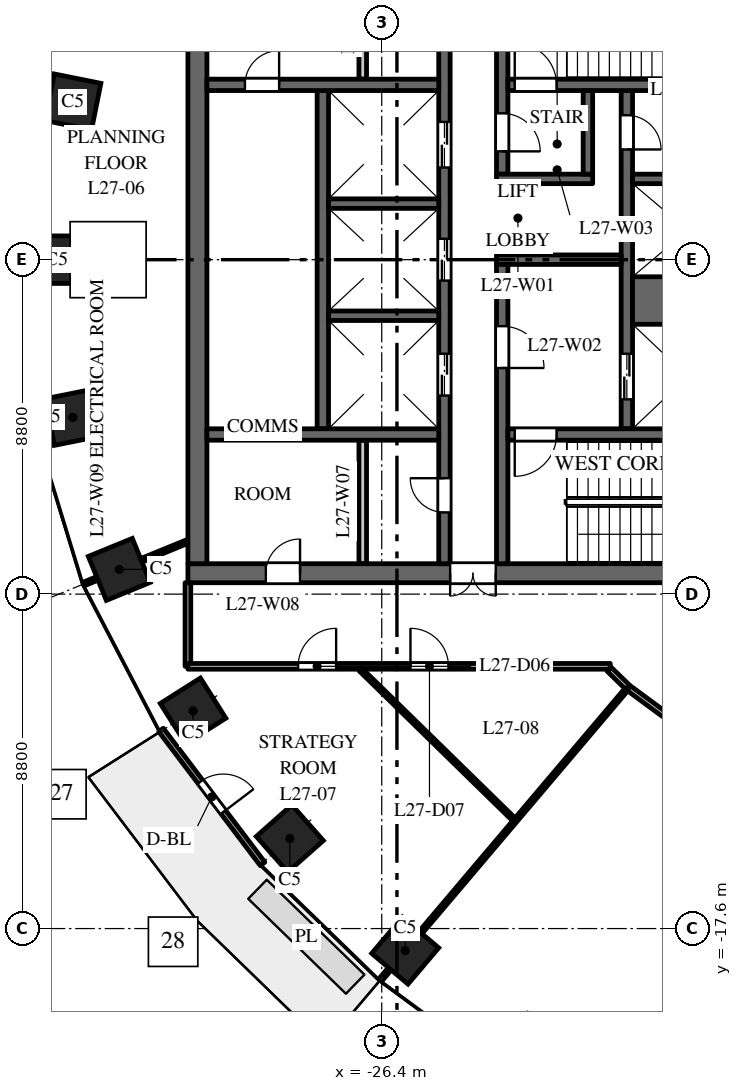
"""IFC4 building model, lengths in metres.
Left out: names, types, materials, properties, quantities, classifications, styles, units other than length and angle.
Written with IfcOpenShell. Run it as: python <this file> out.ifc"""

import sys

from ifc_helpers import new_model, si_unit, direction, frame, frame_2d, origin, origin_2d, place, context, subcontext, project, spatial, rectangle, extrude, element, fill, save


model = new_model("IFC4")
c1 = context("Model", 3, precision=1e-05, world=origin(), true_north=direction((0.0, 1.0)))
c2 = subcontext(c1, "Body", "Model", "MODEL_VIEW")
j1 = project(units=[si_unit("LENGTHUNIT", "METRE"), si_unit("PLANEANGLEUNIT", "RADIAN")], contexts=[c1])
p1 = place(None, origin())
s1 = spatial("IfcSite", under=j1, at=p1, CompositionType="ELEMENT")
p2 = place(p1, origin())
s2 = spatial("IfcBuilding", under=s1, at=p2, CompositionType="ELEMENT")
p3 = place(p2, frame((0.0, 0.0, 120.0)))
s3 = spatial("IfcBuildingStorey", under=s2, at=p3, CompositionType="ELEMENT", Elevation=120.0)
for number, where, z_axis, x_axis in (
    (1, (-34.527, 4.151, 0.0), (0.0, 0.0, 1.0), (-0.197, -0.98, 0.0)),
    (2, (-34.945, 0.0, 0.0), (0.0, 0.0, 1.0), (0.0, -1.0, 0.0)),
    (3, (-34.527, -4.151, 0.0), (0.0, 0.0, 1.0), (0.197, -0.98, 0.0)),
    (4, (-33.305, -8.149, 0.0), (0.0, 0.0, 1.0), (0.379, -0.925, 0.0)),
    (5, (-31.365, -11.871, 0.0), (0.0, 0.0, 1.0), (0.535, -0.845, 0.0)),
    (6, (-28.819, -15.23, 0.0), (0.0, 0.0, 1.0), (0.663, -0.749, 0.0)),
    (7, (-25.783, -18.18, 0.0), (0.0, 0.0, 1.0), (0.763, -0.646, 0.0)),
):
    element("IfcColumn", number, at=place(p3, frame(where, z_axis=z_axis, x_axis=x_axis)), inside=s3, PredefinedType="COLUMN", context=c2, shape_type="SweptSolid", body=[
        extrude(rectangle(XDim=1.25, YDim=1.25, at=origin_2d()), origin(), (0.0, 0.0, 1.0), 4.0),
    ])
p4 = place(p3, frame((-16.5, -8.25, 0.0), z_axis=(0.0, 0.0, 1.0), x_axis=(-1.0, 0.0, 0.0)))
e8 = element("IfcWall", 8, at=p4, inside=s3, PredefinedType="SHEAR", context=c2, shape_type="SweptSolid", body=[
    extrude(rectangle(XDim=15.0, YDim=0.5, at=frame_2d((7.5, 0.0))), origin(), (0.0, 0.0, 1.0), 3.7),
])
p5 = place(p4, frame((6.9, 0.0, 0.0)))
e9 = element("IfcOpeningElement", 9, at=p5, cuts=e8, PredefinedType="OPENING", context=c2, shape_type="SweptSolid", body=[
    extrude(rectangle(XDim=1.2, YDim=2.1, at=frame_2d((0.6, 1.05))), frame((0.0, 0.26, 0.0), z_axis=(0.0, -1.0, 0.0), x_axis=(1.0, 0.0, 0.0)), (0.0, 0.0, 1.0), 0.52),
])
p6 = place(p4, frame((12.05, 0.0, 0.0)))
e10 = element("IfcOpeningElement", 10, at=p6, cuts=e8, PredefinedType="OPENING", context=c2, shape_type="SweptSolid", body=[
    extrude(rectangle(XDim=0.9, YDim=2.1, at=frame_2d((0.45, 1.05))), frame((0.0, 0.26, 0.0), z_axis=(0.0, -1.0, 0.0), x_axis=(1.0, 0.0, 0.0)), (0.0, 0.0, 1.0), 0.52),
])
p7 = place(p3, frame((-27.95, -4.45, 0.0), z_axis=(0.0, 0.0, 1.0), x_axis=(0.0, 1.0, 0.0)))
e11 = element("IfcWall", 11, at=p7, inside=s3, PredefinedType="SHEAR", context=c2, shape_type="SweptSolid", body=[
    extrude(rectangle(XDim=8.9, YDim=0.3, at=frame_2d((4.45, 0.0))), origin(), (0.0, 0.0, 1.0), 3.7),
])
p8 = place(p3, frame((-19.95, -4.45, 0.0), z_axis=(0.0, 0.0, 1.0), x_axis=(0.0, 1.0, 0.0)))
e12 = element("IfcWall", 12, at=p8, inside=s3, PredefinedType="SHEAR", context=c2, shape_type="SweptSolid", body=[
    extrude(rectangle(XDim=8.9, YDim=0.3, at=frame_2d((4.45, 0.0))), origin(), (0.0, 0.0, 1.0), 3.7),
])
p9 = place(p8, frame((0.775, 0.0, 0.0)))
e13 = element("IfcOpeningElement", 13, at=p9, cuts=e12, PredefinedType="OPENING", context=c2, shape_type="SweptSolid", body=[
    extrude(rectangle(XDim=1.2, YDim=2.1, at=frame_2d((0.6, 1.05))), frame((0.0, 0.16, 0.0), z_axis=(0.0, -1.0, 0.0), x_axis=(1.0, 0.0, 0.0)), (0.0, 0.0, 1.0), 0.32),
])
p10 = place(p8, frame((7.35, 0.0, 0.0)))
e14 = element("IfcOpeningElement", 14, at=p10, cuts=e12, PredefinedType="OPENING", context=c2, shape_type="SweptSolid", body=[
    extrude(rectangle(XDim=0.9, YDim=2.1, at=frame_2d((0.45, 1.05))), frame((0.0, 0.16, 0.0), z_axis=(0.0, -1.0, 0.0), x_axis=(1.0, 0.0, 0.0)), (0.0, 0.0, 1.0), 0.32),
])
p11 = place(p3, frame((-24.75, -8.0, 0.0), z_axis=(0.0, 0.0, 1.0), x_axis=(0.0, 1.0, 0.0)))
e15 = element("IfcWall", 15, at=p11, inside=s3, PredefinedType="SHEAR", context=c2, shape_type="SweptSolid", body=[
    extrude(rectangle(XDim=16.0, YDim=0.3, at=frame_2d((8.0, 0.0))), origin(), (0.0, 0.0, 1.0), 3.7),
])
p12 = place(p11, frame((4.425, 0.0, 0.0)))
e16 = element("IfcOpeningElement", 16, at=p12, cuts=e15, PredefinedType="OPENING", context=c2, shape_type="SweptSolid", body=[
    extrude(rectangle(XDim=1.1, YDim=2.1, at=frame_2d((0.55, 1.05))), frame((0.0, 0.16, 0.0), z_axis=(0.0, -1.0, 0.0), x_axis=(1.0, 0.0, 0.0)), (0.0, 0.0, 1.0), 0.32),
])
p13 = place(p11, frame((7.45, 0.0, 0.0)))
e17 = element("IfcOpeningElement", 17, at=p13, cuts=e15, PredefinedType="OPENING", context=c2, shape_type="SweptSolid", body=[
    extrude(rectangle(XDim=1.1, YDim=2.1, at=frame_2d((0.55, 1.05))), frame((0.0, 0.16, 0.0), z_axis=(0.0, -1.0, 0.0), x_axis=(1.0, 0.0, 0.0)), (0.0, 0.0, 1.0), 0.32),
])
p14 = place(p11, frame((10.425, 0.0, 0.0)))
e18 = element("IfcOpeningElement", 18, at=p14, cuts=e15, PredefinedType="OPENING", context=c2, shape_type="SweptSolid", body=[
    extrude(rectangle(XDim=1.2, YDim=2.1, at=frame_2d((0.6, 1.05))), frame((0.0, 0.16, 0.0), z_axis=(0.0, -1.0, 0.0), x_axis=(1.0, 0.0, 0.0)), (0.0, 0.0, 1.0), 0.32),
])
p15 = place(p11, frame((13.75, 0.0, 0.0)))
e19 = element("IfcOpeningElement", 19, at=p15, cuts=e15, PredefinedType="OPENING", context=c2, shape_type="SweptSolid", body=[
    extrude(rectangle(XDim=0.9, YDim=2.1, at=frame_2d((0.45, 1.05))), frame((0.0, 0.16, 0.0), z_axis=(0.0, -1.0, 0.0), x_axis=(1.0, 0.0, 0.0)), (0.0, 0.0, 1.0), 0.32),
])
p16 = place(p11, frame((1.35, 0.0, 0.0)))
e20 = element("IfcOpeningElement", 20, at=p16, cuts=e15, PredefinedType="OPENING", context=c2, shape_type="SweptSolid", body=[
    extrude(rectangle(XDim=0.9, YDim=2.1, at=frame_2d((0.45, 1.05))), frame((0.0, 0.16, 0.0), z_axis=(0.0, -1.0, 0.0), x_axis=(1.0, 0.0, 0.0)), (0.0, 0.0, 1.0), 0.32),
])
p17 = place(p3, frame((-20.1, 0.0, 0.0), z_axis=(0.0, 0.0, 1.0), x_axis=(-1.0, 0.0, 0.0)))
e21 = element("IfcWall", 21, at=p17, inside=s3, PredefinedType="SHEAR", context=c2, shape_type="SweptSolid", body=[
    extrude(rectangle(XDim=3.28, YDim=0.25, at=frame_2d((1.64, 0.0))), origin(), (0.0, 0.0, 1.0), 3.7),
])
p18 = place(p3, frame((-31.25, -8.0, 0.0), z_axis=(0.0, 0.0, 1.0), x_axis=(0.0, 1.0, 0.0)))
e22 = element("IfcWall", 22, at=p18, inside=s3, PredefinedType="SHEAR", context=c2, shape_type="SweptSolid", body=[
    extrude(rectangle(XDim=16.0, YDim=0.5, at=frame_2d((8.0, 0.0))), origin(), (0.0, 0.0, 1.0), 3.7),
])
p19 = place(p3, frame((-24.9, 4.6, 0.0), z_axis=(0.0, 0.0, 1.0), x_axis=(-1.0, 0.0, 0.0)))
e23 = element("IfcWall", 23, at=p19, inside=s3, PredefinedType="SHEAR", context=c2, shape_type="SweptSolid", body=[
    extrude(rectangle(XDim=6.1, YDim=0.3, at=frame_2d((3.05, 0.0))), origin(), (0.0, 0.0, 1.0), 3.7),
])
p20 = place(p19, frame((4.2, 0.0, 0.0)))
e24 = element("IfcOpeningElement", 24, at=p20, cuts=e23, PredefinedType="OPENING", context=c2, shape_type="SweptSolid", body=[
    extrude(rectangle(XDim=0.9, YDim=2.1, at=frame_2d((0.45, 1.05))), frame((0.0, 0.16, 0.0), z_axis=(0.0, -1.0, 0.0), x_axis=(1.0, 0.0, 0.0)), (0.0, 0.0, 1.0), 0.32),
])
for number, where, z_axis, x_axis in (
    (25, (-26.9, 4.75, 0.0), (0.0, 0.0, 1.0), (0.0, 1.0, 0.0)),
    (26, (-26.9, -8.0, 0.0), (0.0, 0.0, 1.0), (0.0, 1.0, 0.0)),
):
    element("IfcWall", number, at=place(p3, frame(where, z_axis=z_axis, x_axis=x_axis)), inside=s3, PredefinedType="PARTITIONING", context=c2, shape_type="SweptSolid", body=[
        extrude(rectangle(XDim=3.25, YDim=0.2, at=frame_2d((1.625, 0.0))), origin(), (0.0, 0.0, 1.0), 3.7),
    ])
p21 = place(p3, frame((-24.9, -4.6, 0.0), z_axis=(0.0, 0.0, 1.0), x_axis=(-1.0, 0.0, 0.0)))
e27 = element("IfcWall", 27, at=p21, inside=s3, PredefinedType="SHEAR", context=c2, shape_type="SweptSolid", body=[
    extrude(rectangle(XDim=6.1, YDim=0.3, at=frame_2d((3.05, 0.0))), origin(), (0.0, 0.0, 1.0), 3.7),
])
p22 = place(p3, frame((-16.9, -1.075, 0.0), z_axis=(0.0, 0.0, 1.0), x_axis=(-1.0, 0.0, 0.0)))
e28 = element("IfcWall", 28, at=p22, inside=s3, PredefinedType="SHEAR", context=c2, shape_type="SweptSolid", body=[
    extrude(rectangle(XDim=2.9, YDim=1.25, at=frame_2d((1.45, 0.0))), origin(), (0.0, 0.0, 1.0), 3.7),
])
for number, where, z_axis, x_axis in (
    (29, (-16.9, 2.125, 0.0), (0.0, 0.0, 1.0), (-1.0, 0.0, 0.0)),
    (30, (-24.9, -1.475, 0.0), (0.0, 0.0, 1.0), (-1.0, 0.0, 0.0)),
    (31, (-24.9, 1.475, 0.0), (0.0, 0.0, 1.0), (-1.0, 0.0, 0.0)),
):
    element("IfcWall", number, at=place(p3, frame(where, z_axis=z_axis, x_axis=x_axis)), inside=s3, PredefinedType="SHEAR", context=c2, shape_type="SweptSolid", body=[
        extrude(rectangle(XDim=2.9, YDim=0.25, at=frame_2d((1.45, 0.0))), origin(), (0.0, 0.0, 1.0), 3.7),
    ])
p23 = place(p3, frame((-23.23, 2.25, 0.0), z_axis=(0.0, 0.0, 1.0), x_axis=(0.0, 1.0, 0.0)))
e32 = element("IfcWall", 32, at=p23, inside=s3, PredefinedType="SHEAR", context=c2, shape_type="SweptSolid", body=[
    extrude(rectangle(XDim=5.75, YDim=0.3, at=frame_2d((2.875, 0.0))), origin(), (0.0, 0.0, 1.0), 3.7),
])
p24 = place(p23, frame((0.6, 0.0, 0.0)))
e33 = element("IfcOpeningElement", 33, at=p24, cuts=e32, PredefinedType="OPENING", context=c2, shape_type="SweptSolid", body=[
    extrude(rectangle(XDim=1.0, YDim=2.1, at=frame_2d((0.5, 1.05))), frame((0.0, 0.16, 0.0), z_axis=(0.0, -1.0, 0.0), x_axis=(1.0, 0.0, 0.0)), (0.0, 0.0, 1.0), 0.32),
])
p25 = place(p3, frame((-23.23, -8.0, 0.0), z_axis=(0.0, 0.0, 1.0), x_axis=(0.0, 1.0, 0.0)))
e34 = element("IfcWall", 34, at=p25, inside=s3, PredefinedType="SHEAR", context=c2, shape_type="SweptSolid", body=[
    extrude(rectangle(XDim=7.875, YDim=0.3, at=frame_2d((3.938, 0.0))), origin(), (0.0, 0.0, 1.0), 3.7),
])
p26 = place(p25, frame((5.15, 0.0, 0.0)))
e35 = element("IfcOpeningElement", 35, at=p26, cuts=e34, PredefinedType="OPENING", context=c2, shape_type="SweptSolid", body=[
    extrude(rectangle(XDim=1.1, YDim=2.1, at=frame_2d((0.55, 1.05))), frame((0.0, 0.16, 0.0), z_axis=(0.0, -1.0, 0.0), x_axis=(1.0, 0.0, 0.0)), (0.0, 0.0, 1.0), 0.32),
])
p27 = place(p3, frame((-16.9, 4.6, 0.0), z_axis=(0.0, 0.0, 1.0), x_axis=(-1.0, 0.0, 0.0)))
e36 = element("IfcWall", 36, at=p27, inside=s3, PredefinedType="SHEAR", context=c2, shape_type="SweptSolid", body=[
    extrude(rectangle(XDim=6.18, YDim=0.3, at=frame_2d((3.09, 0.0))), origin(), (0.0, 0.0, 1.0), 3.7),
])
p28 = place(p27, frame((4.9, 0.0, 0.0)))
e37 = element("IfcOpeningElement", 37, at=p28, cuts=e36, PredefinedType="OPENING", context=c2, shape_type="SweptSolid", body=[
    extrude(rectangle(XDim=1.1, YDim=2.1, at=frame_2d((0.55, 1.05))), frame((0.0, 0.16, 0.0), z_axis=(0.0, -1.0, 0.0), x_axis=(1.0, 0.0, 0.0)), (0.0, 0.0, 1.0), 0.32),
])
p29 = place(p3, frame((-16.9, -4.6, 0.0), z_axis=(0.0, 0.0, 1.0), x_axis=(-1.0, 0.0, 0.0)))
e38 = element("IfcWall", 38, at=p29, inside=s3, PredefinedType="SHEAR", context=c2, shape_type="SweptSolid", body=[
    extrude(rectangle(XDim=6.18, YDim=0.3, at=frame_2d((3.09, 0.0))), origin(), (0.0, 0.0, 1.0), 3.7),
])
p30 = place(p29, frame((4.9, 0.0, 0.0)))
e39 = element("IfcOpeningElement", 39, at=p30, cuts=e38, PredefinedType="OPENING", context=c2, shape_type="SweptSolid", body=[
    extrude(rectangle(XDim=1.1, YDim=2.1, at=frame_2d((0.55, 1.05))), frame((0.0, 0.16, 0.0), z_axis=(0.0, -1.0, 0.0), x_axis=(1.0, 0.0, 0.0)), (0.0, 0.0, 1.0), 0.32),
])
p31 = place(p3, frame((-20.85, 2.125, 0.0), z_axis=(0.0, 0.0, 1.0), x_axis=(-1.0, 0.0, 0.0)))
e40 = element("IfcWall", 40, at=p31, inside=s3, PredefinedType="SHEAR", context=c2, shape_type="SweptSolid", body=[
    extrude(rectangle(XDim=2.53, YDim=0.25, at=frame_2d((1.265, 0.0))), origin(), (0.0, 0.0, 1.0), 3.7),
])
p32 = place(p3, frame((-20.975, 2.25, 0.0), z_axis=(0.0, 0.0, 1.0), x_axis=(0.0, 1.0, 0.0)))
e41 = element("IfcWall", 41, at=p32, inside=s3, PredefinedType="SHEAR", context=c2, shape_type="SweptSolid", body=[
    extrude(rectangle(XDim=2.2, YDim=0.25, at=frame_2d((1.1, 0.0))), origin(), (0.0, 0.0, 1.0), 3.7),
])
p33 = place(p3, frame((-32.208, -12.374, 0.0), z_axis=(0.0, 0.0, 1.0), x_axis=(0.604045763106, -0.796949632081, 0.0)))
e42 = element("IfcWall", 42, at=p33, inside=s3, PredefinedType="STANDARD", context=c2, shape_type="SweptSolid", body=[
    extrude(rectangle(XDim=4.423, YDim=0.15, at=frame_2d((2.212, 0.0))), origin(), (0.0, 0.0, 1.0), 3.7),
])
p34 = place(p33, frame((1.712, 0.0, 0.0)))
e43 = element("IfcOpeningElement", 43, at=p34, cuts=e42, PredefinedType="OPENING", context=c2, shape_type="SweptSolid", body=[
    extrude(rectangle(XDim=1.0, YDim=2.4, at=frame_2d((0.5, 1.2))), frame((0.0, 0.085, 0.0), z_axis=(0.0, -1.0, 0.0), x_axis=(1.0, 0.0, 0.0)), (0.0, 0.0, 1.0), 0.17),
])
p35 = place(p3, frame((-34.234, -8.53, 0.0), z_axis=(0.0, 0.0, 1.0), x_axis=(0.925344112436, 0.379128307542, 0.0)))
e44 = element("IfcWall", 44, at=p35, inside=s3, PredefinedType="PARTITIONING", context=c2, shape_type="SweptSolid", body=[
    extrude(rectangle(XDim=2.954, YDim=0.1, at=frame_2d((1.477, 0.0))), origin(), (0.0, 0.0, 1.0), 2.9),
])
p36 = place(p3, frame((-31.5, -10.7, 0.0), z_axis=(0.0, 0.0, 1.0), x_axis=(0.0, 1.0, 0.0)))
e45 = element("IfcWall", 45, at=p36, inside=s3, PredefinedType="PARTITIONING", context=c2, shape_type="SweptSolid", body=[
    extrude(rectangle(XDim=2.2, YDim=0.15, at=frame_2d((1.1, 0.0))), origin(), (0.0, 0.0, 1.0), 3.7),
])
p37 = place(p3, frame((-31.5, -10.7, 0.0), z_axis=(0.0, 0.0, 1.0), x_axis=(1.0, 0.0, 0.0)))
e46 = element("IfcWall", 46, at=p37, inside=s3, PredefinedType="PARTITIONING", context=c2, shape_type="SweptSolid", body=[
    extrude(rectangle(XDim=11.113, YDim=0.15, at=frame_2d((5.557, 0.0))), origin(), (0.0, 0.0, 1.0), 3.1),
])
p38 = place(p37, frame((2.9, 0.0, 0.0)))
e47 = element("IfcOpeningElement", 47, at=p38, cuts=e46, PredefinedType="OPENING", context=c2, shape_type="SweptSolid", body=[
    extrude(rectangle(XDim=1.0, YDim=2.1, at=frame_2d((0.5, 1.05))), frame((0.0, 0.085, 0.0), z_axis=(0.0, -1.0, 0.0), x_axis=(1.0, 0.0, 0.0)), (0.0, 0.0, 1.0), 0.17),
])
p39 = place(p37, frame((5.856, 0.0, 0.0)))
e48 = element("IfcOpeningElement", 48, at=p39, cuts=e46, PredefinedType="OPENING", context=c2, shape_type="SweptSolid", body=[
    extrude(rectangle(XDim=1.0, YDim=2.1, at=frame_2d((0.5, 1.05))), frame((0.0, 0.085, 0.0), z_axis=(0.0, -1.0, 0.0), x_axis=(1.0, 0.0, 0.0)), (0.0, 0.0, 1.0), 0.17),
])
p40 = place(p3, frame((-26.965, -10.778, 0.0), z_axis=(0.0, 0.0, 1.0), x_axis=(0.715118482903, -0.699003258512, 0.0)))
e49 = element("IfcWall", 49, at=p40, inside=s3, PredefinedType="PARTITIONING", context=c2, shape_type="SweptSolid", body=[
    extrude(rectangle(XDim=5.651, YDim=0.1, at=frame_2d((2.825, 0.0))), origin(), (0.0, 0.0, 1.0), 3.7),
])
p41 = place(p3, frame((-26.43, -18.945, 0.0), z_axis=(0.0, 0.0, 1.0), x_axis=(0.64633128205, 0.763056927, 0.0)))
e50 = element("IfcWall", 50, at=p41, inside=s3, PredefinedType="PARTITIONING", context=c2, shape_type="SweptSolid", body=[
    extrude(rectangle(XDim=10.069, YDim=0.1, at=frame_2d((5.034, 0.0))), origin(), (0.0, 0.0, 1.0), 3.7),
])
p42 = place(p3, frame((-20.418, -10.775, 0.0), z_axis=(0.0, 0.0, 1.0), x_axis=(0.717145300924, -0.69692368116, 0.0)))
e51 = element("IfcWall", 51, at=p42, inside=s3, PredefinedType="PARTITIONING", context=c2, shape_type="SweptSolid", body=[
    extrude(rectangle(XDim=0.676, YDim=0.15, at=frame_2d((0.338, 0.0))), origin(), (0.0, 0.0, 1.0), 3.7),
])
p43 = place(p3, frame((-19.903, -11.272, 0.0), z_axis=(0.0, 0.0, 1.0), x_axis=(0.805228684186, -0.592964388613, 0.0)))
e52 = element("IfcWall", 52, at=p43, inside=s3, PredefinedType="PARTITIONING", context=c2, shape_type="SweptSolid", body=[
    extrude(rectangle(XDim=3.052, YDim=0.15, at=frame_2d((1.526, 0.0))), origin(), (0.0, 0.0, 1.0), 2.75),
])
p44 = place(p9, origin())
e53 = element("IfcDoor", 53, at=p44, inside=s3, OperationType="DOUBLE_DOOR_SLIDING", PredefinedType="DOOR", context=c2, shape_type="SweptSolid", body=[
    extrude(rectangle(XDim=1.2, YDim=2.1, at=frame_2d((0.6, 1.05))), frame((0.0, 0.025, 0.0), z_axis=(0.0, -1.0, 0.0), x_axis=(1.0, 0.0, 0.0)), (0.0, 0.0, 1.0), 0.05),
])
fill(e13, e53)
p45 = place(p12, origin())
e54 = element("IfcDoor", 54, at=p45, inside=s3, OperationType="DOUBLE_DOOR_SLIDING", PredefinedType="DOOR", context=c2, shape_type="SweptSolid", body=[
    extrude(rectangle(XDim=1.1, YDim=2.1, at=frame_2d((0.55, 1.05))), frame((0.0, 0.025, 0.0), z_axis=(0.0, -1.0, 0.0), x_axis=(1.0, 0.0, 0.0)), (0.0, 0.0, 1.0), 0.05),
])
fill(e16, e54)
p46 = place(p13, origin())
e55 = element("IfcDoor", 55, at=p46, inside=s3, OperationType="DOUBLE_DOOR_SLIDING", PredefinedType="DOOR", context=c2, shape_type="SweptSolid", body=[
    extrude(rectangle(XDim=1.1, YDim=2.1, at=frame_2d((0.55, 1.05))), frame((0.0, 0.025, 0.0), z_axis=(0.0, -1.0, 0.0), x_axis=(1.0, 0.0, 0.0)), (0.0, 0.0, 1.0), 0.05),
])
fill(e17, e55)
p47 = place(p14, origin())
e56 = element("IfcDoor", 56, at=p47, inside=s3, OperationType="DOUBLE_DOOR_SLIDING", PredefinedType="DOOR", context=c2, shape_type="SweptSolid", body=[
    extrude(rectangle(XDim=1.2, YDim=2.1, at=frame_2d((0.6, 1.05))), frame((0.0, 0.025, 0.0), z_axis=(0.0, -1.0, 0.0), x_axis=(1.0, 0.0, 0.0)), (0.0, 0.0, 1.0), 0.05),
])
fill(e18, e56)
p48 = place(p28, origin())
e57 = element("IfcDoor", 57, at=p48, inside=s3, OperationType="SINGLE_SWING_RIGHT", PredefinedType="DOOR", context=c2, shape_type="SweptSolid", body=[
    extrude(rectangle(XDim=1.1, YDim=2.1, at=frame_2d((0.55, 1.05))), frame((0.0, 0.025, 0.0), z_axis=(0.0, -1.0, 0.0), x_axis=(1.0, 0.0, 0.0)), (0.0, 0.0, 1.0), 0.05),
])
fill(e37, e57)
p49 = place(p30, origin())
e58 = element("IfcDoor", 58, at=p49, inside=s3, OperationType="SINGLE_SWING_LEFT", PredefinedType="DOOR", context=c2, shape_type="SweptSolid", body=[
    extrude(rectangle(XDim=1.1, YDim=2.1, at=frame_2d((0.55, 1.05))), frame((0.0, 0.025, 0.0), z_axis=(0.0, -1.0, 0.0), x_axis=(1.0, 0.0, 0.0)), (0.0, 0.0, 1.0), 0.05),
])
fill(e39, e58)
p50 = place(p26, origin())
e59 = element("IfcDoor", 59, at=p50, inside=s3, OperationType="SINGLE_SWING_LEFT", PredefinedType="DOOR", context=c2, shape_type="SweptSolid", body=[
    extrude(rectangle(XDim=1.1, YDim=2.1, at=frame_2d((0.55, 1.05))), frame((0.0, 0.025, 0.0), z_axis=(0.0, -1.0, 0.0), x_axis=(1.0, 0.0, 0.0)), (0.0, 0.0, 1.0), 0.05),
])
fill(e35, e59)
p51 = place(p24, origin())
e60 = element("IfcDoor", 60, at=p51, inside=s3, OperationType="SINGLE_SWING_LEFT", PredefinedType="DOOR", context=c2, shape_type="SweptSolid", body=[
    extrude(rectangle(XDim=1.0, YDim=2.1, at=frame_2d((0.5, 1.05))), frame((0.0, 0.025, 0.0), z_axis=(0.0, -1.0, 0.0), x_axis=(1.0, 0.0, 0.0)), (0.0, 0.0, 1.0), 0.05),
])
fill(e33, e60)
p52 = place(p5, origin())
e61 = element("IfcDoor", 61, at=p52, inside=s3, OperationType="DOUBLE_DOOR_DOUBLE_SWING", PredefinedType="DOOR", context=c2, shape_type="SweptSolid", body=[
    extrude(rectangle(XDim=1.2, YDim=2.1, at=frame_2d((0.6, 1.05))), frame((0.0, 0.025, 0.0), z_axis=(0.0, -1.0, 0.0), x_axis=(1.0, 0.0, 0.0)), (0.0, 0.0, 1.0), 0.05),
])
fill(e9, e61)
p53 = place(p10, origin())
e62 = element("IfcDoor", 62, at=p53, inside=s3, OperationType="SINGLE_SWING_LEFT", PredefinedType="DOOR", context=c2, shape_type="SweptSolid", body=[
    extrude(rectangle(XDim=0.9, YDim=2.1, at=frame_2d((0.45, 1.05))), frame((0.0, 0.025, 0.0), z_axis=(0.0, -1.0, 0.0), x_axis=(1.0, 0.0, 0.0)), (0.0, 0.0, 1.0), 0.05),
])
fill(e14, e62)
p54 = place(p16, origin())
e63 = element("IfcDoor", 63, at=p54, inside=s3, OperationType="SINGLE_SWING_LEFT", PredefinedType="DOOR", context=c2, shape_type="SweptSolid", body=[
    extrude(rectangle(XDim=0.9, YDim=2.1, at=frame_2d((0.45, 1.05))), frame((0.0, 0.025, 0.0), z_axis=(0.0, -1.0, 0.0), x_axis=(1.0, 0.0, 0.0)), (0.0, 0.0, 1.0), 0.05),
])
fill(e20, e63)
p55 = place(p6, origin())
e64 = element("IfcDoor", 64, at=p55, inside=s3, OperationType="SINGLE_SWING_LEFT", PredefinedType="DOOR", context=c2, shape_type="SweptSolid", body=[
    extrude(rectangle(XDim=0.9, YDim=2.1, at=frame_2d((0.45, 1.05))), frame((0.0, 0.025, 0.0), z_axis=(0.0, -1.0, 0.0), x_axis=(1.0, 0.0, 0.0)), (0.0, 0.0, 1.0), 0.05),
])
fill(e10, e64)
p56 = place(p20, origin())
e65 = element("IfcDoor", 65, at=p56, inside=s3, OperationType="SINGLE_SWING_LEFT", PredefinedType="DOOR", context=c2, shape_type="SweptSolid", body=[
    extrude(rectangle(XDim=0.9, YDim=2.1, at=frame_2d((0.45, 1.05))), frame((0.0, 0.025, 0.0), z_axis=(0.0, -1.0, 0.0), x_axis=(1.0, 0.0, 0.0)), (0.0, 0.0, 1.0), 0.05),
])
fill(e24, e65)
p57 = place(p34, origin())
e66 = element("IfcDoor", 66, at=p57, inside=s3, OperationType="SINGLE_SWING_RIGHT", PredefinedType="DOOR", context=c2, shape_type="SweptSolid", body=[
    extrude(rectangle(XDim=1.0, YDim=2.4, at=frame_2d((0.5, 1.2))), frame((0.0, 0.025, 0.0), z_axis=(0.0, -1.0, 0.0), x_axis=(1.0, 0.0, 0.0)), (0.0, 0.0, 1.0), 0.05),
])
fill(e43, e66)
p58 = place(p38, origin())
e67 = element("IfcDoor", 67, at=p58, inside=s3, OperationType="SINGLE_SWING_RIGHT", PredefinedType="DOOR", context=c2, shape_type="SweptSolid", body=[
    extrude(rectangle(XDim=1.0, YDim=2.1, at=frame_2d((0.5, 1.05))), frame((0.0, 0.025, 0.0), z_axis=(0.0, -1.0, 0.0), x_axis=(1.0, 0.0, 0.0)), (0.0, 0.0, 1.0), 0.05),
])
fill(e47, e67)
p59 = place(p39, origin())
e68 = element("IfcDoor", 68, at=p59, inside=s3, OperationType="SINGLE_SWING_LEFT", PredefinedType="DOOR", context=c2, shape_type="SweptSolid", body=[
    extrude(rectangle(XDim=1.0, YDim=2.1, at=frame_2d((0.5, 1.05))), frame((0.0, 0.025, 0.0), z_axis=(0.0, -1.0, 0.0), x_axis=(1.0, 0.0, 0.0)), (0.0, 0.0, 1.0), 0.05),
])
fill(e48, e68)
save(model, sys.argv[1])
